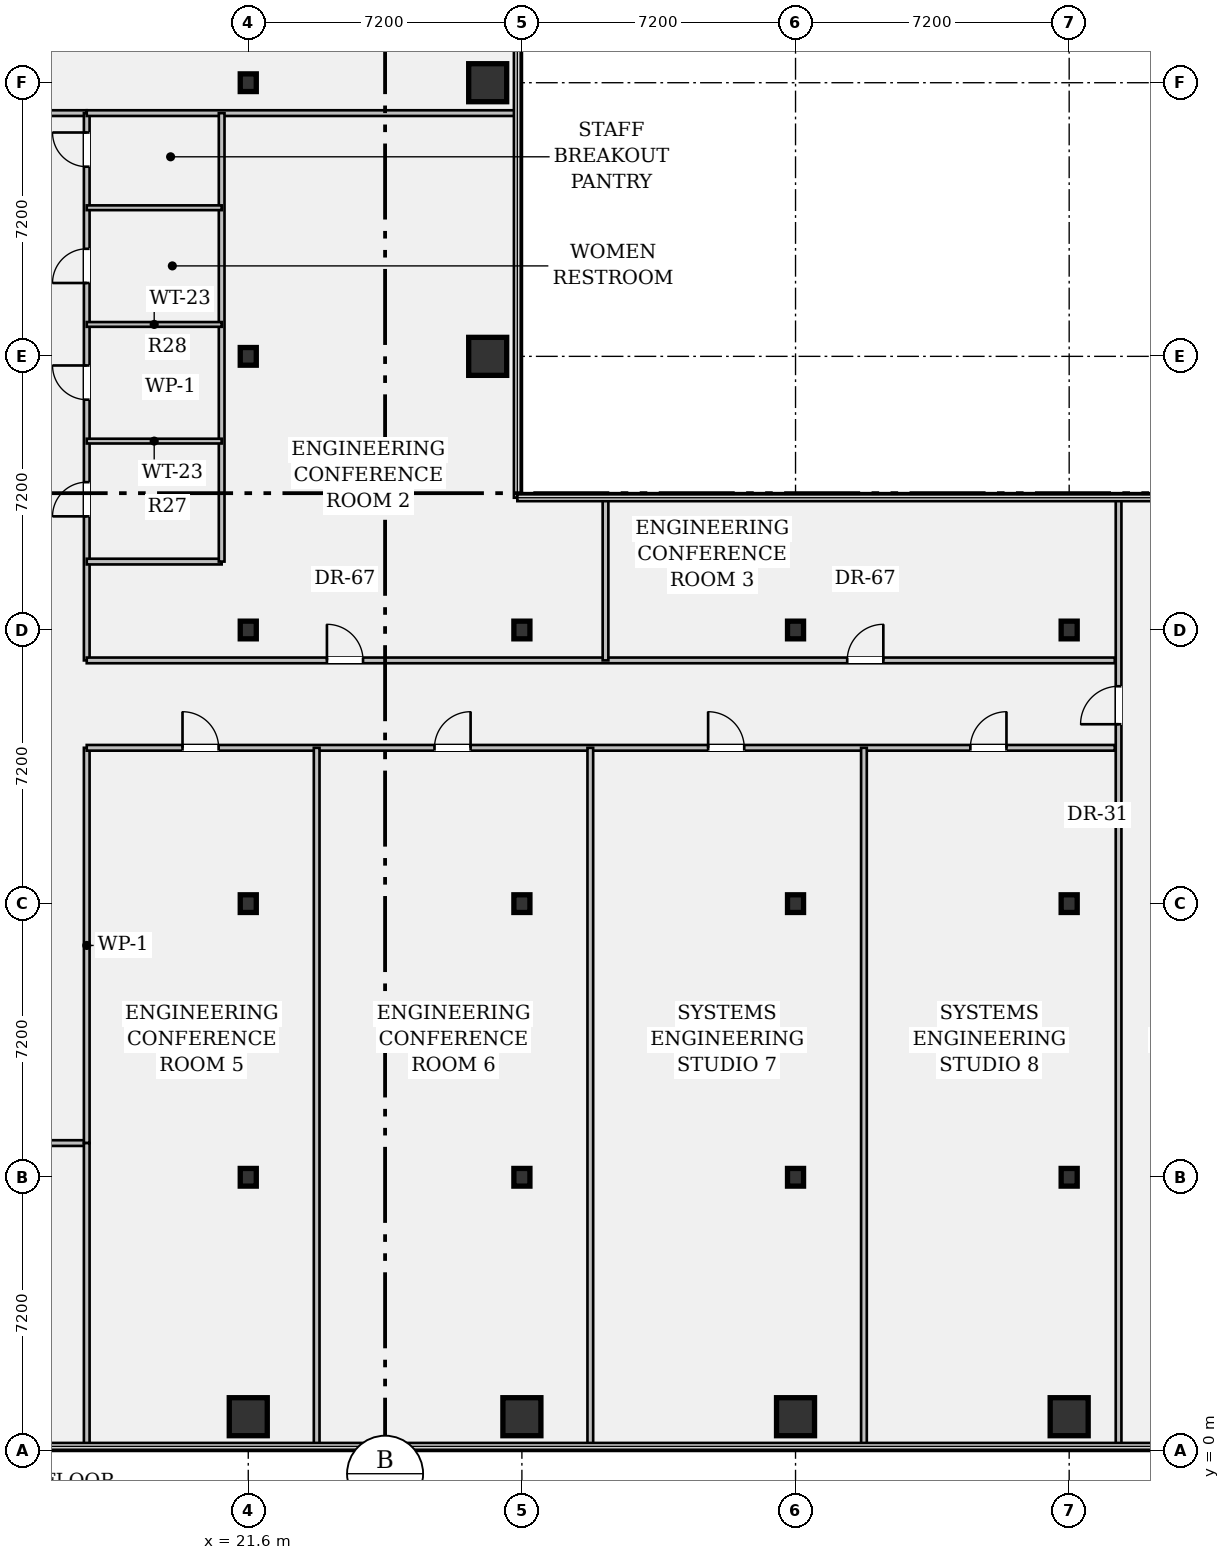
"""IFC4 building model, lengths in metres.
Left out: names, types, materials, properties, quantities, classifications, styles, units other than length and angle.
Written with IfcOpenShell. Run it as: python <this file> out.ifc"""

import sys

from ifc_helpers import new_model, si_unit, direction, frame, frame_2d, origin, origin_2d, place, context, subcontext, project, spatial, rectangle, hollow_rectangle, i_section, extrude, element, fill, save


model = new_model("IFC4")
c1 = context("Model", 3, precision=1e-05, world=origin(), true_north=direction((0.0, 1.0)))
c2 = subcontext(c1, "Body", "Model", "MODEL_VIEW")
j1 = project(units=[si_unit("LENGTHUNIT", "METRE"), si_unit("PLANEANGLEUNIT", "RADIAN")], contexts=[c1])
p1 = place(None, origin())
s1 = spatial("IfcSite", under=j1, at=p1, CompositionType="ELEMENT")
p2 = place(p1, origin())
s2 = spatial("IfcBuilding", under=s1, at=p2, CompositionType="ELEMENT")
p3 = place(p2, frame((0.0, 0.0, 58.1)))
s3 = spatial("IfcBuildingStorey", under=s2, at=p3, CompositionType="ELEMENT", Elevation=58.1)
p4 = place(p3, frame((21.6, 0.9, 0.0), z_axis=(0.0, 0.0, 1.0), x_axis=(1.0, 0.0, 0.0)))
e1 = element("IfcColumn", 1, at=p4, inside=s3, PredefinedType="COLUMN", context=c2, shape_type="SweptSolid", body=[
    extrude(hollow_rectangle(XDim=1.0, YDim=1.0, WallThickness=0.065, at=origin_2d()), origin(), (0.0, 0.0, 1.0), 3.57),
])
for number, where, z_axis, x_axis in (
    (2, (21.6, 7.2, 0.0), (0.0, 0.0, 1.0), (1.0, 0.0, 0.0)),
    (3, (21.6, 14.4, 0.0), (0.0, 0.0, 1.0), (1.0, 0.0, 0.0)),
    (4, (21.6, 21.6, 0.0), (0.0, 0.0, 1.0), (1.0, 0.0, 0.0)),
    (5, (21.6, 28.8, 0.0), (0.0, 0.0, 1.0), (1.0, 0.0, 0.0)),
    (6, (21.6, 36.0, 0.0), (0.0, 0.0, 1.0), (1.0, 0.0, 0.0)),
):
    element("IfcColumn", number, at=place(p3, frame(where, z_axis=z_axis, x_axis=x_axis)), inside=s3, PredefinedType="COLUMN", context=c2, shape_type="SweptSolid", body=[
        extrude(i_section(OverallWidth=0.422, OverallDepth=0.465, WebThickness=0.045, FlangeThickness=0.073, FilletRadius=0.018, at=origin_2d()), origin(), (0.0, 0.0, 1.0), 3.57),
    ])
for number, where, z_axis, x_axis in (
    (7, (27.9, 28.8, 0.0), (0.0, 0.0, 1.0), (1.0, 0.0, 0.0)),
    (8, (27.9, 36.0, 0.0), (0.0, 0.0, 1.0), (1.0, 0.0, 0.0)),
    (9, (28.8, 0.9, 0.0), (0.0, 0.0, 1.0), (1.0, 0.0, 0.0)),
):
    element("IfcColumn", number, at=place(p3, frame(where, z_axis=z_axis, x_axis=x_axis)), inside=s3, PredefinedType="COLUMN", context=c2, shape_type="SweptSolid", body=[
        extrude(hollow_rectangle(XDim=1.0, YDim=1.0, WallThickness=0.065, at=origin_2d()), origin(), (0.0, 0.0, 1.0), 3.57),
    ])
for number, where, z_axis, x_axis in (
    (10, (28.8, 7.2, 0.0), (0.0, 0.0, 1.0), (1.0, 0.0, 0.0)),
    (11, (28.8, 14.4, 0.0), (0.0, 0.0, 1.0), (1.0, 0.0, 0.0)),
    (12, (28.8, 21.6, 0.0), (0.0, 0.0, 1.0), (1.0, 0.0, 0.0)),
):
    element("IfcColumn", number, at=place(p3, frame(where, z_axis=z_axis, x_axis=x_axis)), inside=s3, PredefinedType="COLUMN", context=c2, shape_type="SweptSolid", body=[
        extrude(i_section(OverallWidth=0.422, OverallDepth=0.465, WebThickness=0.045, FlangeThickness=0.073, FilletRadius=0.018, at=origin_2d()), origin(), (0.0, 0.0, 1.0), 3.57),
    ])
p5 = place(p3, frame((36.0, 0.9, 0.0), z_axis=(0.0, 0.0, 1.0), x_axis=(1.0, 0.0, 0.0)))
e13 = element("IfcColumn", 13, at=p5, inside=s3, PredefinedType="COLUMN", context=c2, shape_type="SweptSolid", body=[
    extrude(hollow_rectangle(XDim=1.0, YDim=1.0, WallThickness=0.065, at=origin_2d()), origin(), (0.0, 0.0, 1.0), 3.57),
])
for number, where, z_axis, x_axis in (
    (14, (36.0, 7.2, 0.0), (0.0, 0.0, 1.0), (1.0, 0.0, 0.0)),
    (15, (36.0, 14.4, 0.0), (0.0, 0.0, 1.0), (1.0, 0.0, 0.0)),
    (16, (36.0, 21.6, 0.0), (0.0, 0.0, 1.0), (1.0, 0.0, 0.0)),
):
    element("IfcColumn", number, at=place(p3, frame(where, z_axis=z_axis, x_axis=x_axis)), inside=s3, PredefinedType="COLUMN", context=c2, shape_type="SweptSolid", body=[
        extrude(i_section(OverallWidth=0.422, OverallDepth=0.465, WebThickness=0.045, FlangeThickness=0.073, FilletRadius=0.018, at=origin_2d()), origin(), (0.0, 0.0, 1.0), 3.57),
    ])
p6 = place(p3, frame((43.2, 0.9, 0.0), z_axis=(0.0, 0.0, 1.0), x_axis=(1.0, 0.0, 0.0)))
e17 = element("IfcColumn", 17, at=p6, inside=s3, PredefinedType="COLUMN", context=c2, shape_type="SweptSolid", body=[
    extrude(hollow_rectangle(XDim=1.0, YDim=1.0, WallThickness=0.065, at=origin_2d()), origin(), (0.0, 0.0, 1.0), 3.57),
])
for number, where, z_axis, x_axis in (
    (18, (43.2, 7.2, 0.0), (0.0, 0.0, 1.0), (1.0, 0.0, 0.0)),
    (19, (43.2, 14.4, 0.0), (0.0, 0.0, 1.0), (1.0, 0.0, 0.0)),
    (20, (43.2, 21.6, 0.0), (0.0, 0.0, 1.0), (1.0, 0.0, 0.0)),
):
    element("IfcColumn", number, at=place(p3, frame(where, z_axis=z_axis, x_axis=x_axis)), inside=s3, PredefinedType="COLUMN", context=c2, shape_type="SweptSolid", body=[
        extrude(i_section(OverallWidth=0.422, OverallDepth=0.465, WebThickness=0.045, FlangeThickness=0.073, FilletRadius=0.018, at=origin_2d()), origin(), (0.0, 0.0, 1.0), 3.57),
    ])
p7 = place(p3, frame((14.4, 8.1, 0.0), z_axis=(0.0, 0.0, 1.0), x_axis=(1.0, 0.0, 0.0)))
e21 = element("IfcWall", 21, at=p7, inside=s3, PredefinedType="PARTITIONING", context=c2, shape_type="SweptSolid", body=[
    extrude(rectangle(XDim=2.95, YDim=0.15, at=frame_2d((1.475, 0.0))), origin(), (0.0, 0.0, 1.0), 3.088),
])
p8 = place(p7, frame((0.95, 0.0, 0.0)))
e22 = element("IfcOpeningElement", 22, at=p8, cuts=e21, PredefinedType="OPENING", context=c2, shape_type="SweptSolid", body=[
    extrude(rectangle(XDim=0.95, YDim=2.15, at=frame_2d((0.475, 1.075))), frame((0.0, 0.087, 0.0), z_axis=(0.0, -1.0, 0.0), x_axis=(1.0, 0.0, 0.0)), (0.0, 0.0, 1.0), 0.174),
])
p9 = place(p3, frame((14.4, 35.2, 0.0), z_axis=(0.0, 0.0, 1.0), x_axis=(1.0, 0.0, 0.0)))
e23 = element("IfcWall", 23, at=p9, inside=s3, PredefinedType="PARTITIONING", context=c2, shape_type="SweptSolid", body=[
    extrude(rectangle(XDim=2.95, YDim=0.15, at=frame_2d((1.475, 0.0))), origin(), (0.0, 0.0, 1.0), 3.088),
])
p10 = place(p9, frame((0.95, 0.0, 0.0)))
e24 = element("IfcOpeningElement", 24, at=p10, cuts=e23, PredefinedType="OPENING", context=c2, shape_type="SweptSolid", body=[
    extrude(rectangle(XDim=1.0, YDim=2.15, at=frame_2d((0.5, 1.075))), frame((0.0, 0.087, 0.0), z_axis=(0.0, -1.0, 0.0), x_axis=(1.0, 0.0, 0.0)), (0.0, 0.0, 1.0), 0.174),
])
p11 = place(p3, frame((17.35, 8.1, 0.0), z_axis=(0.0, 0.0, 1.0), x_axis=(0.0, 1.0, 0.0)))
e25 = element("IfcWall", 25, at=p11, inside=s3, PredefinedType="PARTITIONING", context=c2, shape_type="SweptSolid", body=[
    extrude(rectangle(XDim=10.4, YDim=0.15, at=frame_2d((5.2, 0.0))), origin(), (0.0, 0.0, 1.0), 2.699),
])
p12 = place(p3, frame((17.35, 20.8, 0.0), z_axis=(0.0, 0.0, 1.0), x_axis=(0.0, 1.0, 0.0)))
e26 = element("IfcWall", 26, at=p12, inside=s3, PredefinedType="PARTITIONING", context=c2, shape_type="SweptSolid", body=[
    extrude(rectangle(XDim=14.4, YDim=0.15, at=frame_2d((7.2, 0.0))), origin(), (0.0, 0.0, 1.0), 2.699),
])
p13 = place(p12, frame((3.79, 0.0, 0.0)))
e27 = element("IfcOpeningElement", 27, at=p13, cuts=e26, PredefinedType="OPENING", context=c2, shape_type="SweptSolid", body=[
    extrude(rectangle(XDim=0.9, YDim=2.15, at=frame_2d((0.45, 1.075))), frame((0.0, 0.087, 0.0), z_axis=(0.0, -1.0, 0.0), x_axis=(1.0, 0.0, 0.0)), (0.0, 0.0, 1.0), 0.174),
])
p14 = place(p12, frame((6.86, 0.0, 0.0)))
e28 = element("IfcOpeningElement", 28, at=p14, cuts=e26, PredefinedType="OPENING", context=c2, shape_type="SweptSolid", body=[
    extrude(rectangle(XDim=0.9, YDim=2.15, at=frame_2d((0.45, 1.075))), frame((0.0, 0.087, 0.0), z_axis=(0.0, -1.0, 0.0), x_axis=(1.0, 0.0, 0.0)), (0.0, 0.0, 1.0), 0.174),
])
p15 = place(p12, frame((9.93, 0.0, 0.0)))
e29 = element("IfcOpeningElement", 29, at=p15, cuts=e26, PredefinedType="OPENING", context=c2, shape_type="SweptSolid", body=[
    extrude(rectangle(XDim=0.9, YDim=2.15, at=frame_2d((0.45, 1.075))), frame((0.0, 0.087, 0.0), z_axis=(0.0, -1.0, 0.0), x_axis=(1.0, 0.0, 0.0)), (0.0, 0.0, 1.0), 0.174),
])
p16 = place(p12, frame((12.99, 0.0, 0.0)))
e30 = element("IfcOpeningElement", 30, at=p16, cuts=e26, PredefinedType="OPENING", context=c2, shape_type="SweptSolid", body=[
    extrude(rectangle(XDim=0.9, YDim=2.15, at=frame_2d((0.45, 1.075))), frame((0.0, 0.087, 0.0), z_axis=(0.0, -1.0, 0.0), x_axis=(1.0, 0.0, 0.0)), (0.0, 0.0, 1.0), 0.174),
])
p17 = place(p3, frame((17.35, 18.5, 0.0), z_axis=(0.0, 0.0, 1.0), x_axis=(1.0, 0.0, 0.0)))
e31 = element("IfcWall", 31, at=p17, inside=s3, PredefinedType="PARTITIONING", context=c2, shape_type="SweptSolid", body=[
    extrude(rectangle(XDim=27.05, YDim=0.15, at=frame_2d((13.525, 0.0))), origin(), (0.0, 0.0, 1.0), 2.699),
])
p18 = place(p17, frame((2.52, 0.0, 0.0)))
e32 = element("IfcOpeningElement", 32, at=p18, cuts=e31, PredefinedType="OPENING", context=c2, shape_type="SweptSolid", body=[
    extrude(rectangle(XDim=0.95, YDim=2.15, at=frame_2d((0.475, 1.075))), frame((0.0, 0.087, 0.0), z_axis=(0.0, -1.0, 0.0), x_axis=(1.0, 0.0, 0.0)), (0.0, 0.0, 1.0), 0.174),
])
p19 = place(p17, frame((9.15, 0.0, 0.0)))
e33 = element("IfcOpeningElement", 33, at=p19, cuts=e31, PredefinedType="OPENING", context=c2, shape_type="SweptSolid", body=[
    extrude(rectangle(XDim=0.95, YDim=2.15, at=frame_2d((0.475, 1.075))), frame((0.0, 0.087, 0.0), z_axis=(0.0, -1.0, 0.0), x_axis=(1.0, 0.0, 0.0)), (0.0, 0.0, 1.0), 0.174),
])
p20 = place(p17, frame((16.35, 0.0, 0.0)))
e34 = element("IfcOpeningElement", 34, at=p20, cuts=e31, PredefinedType="OPENING", context=c2, shape_type="SweptSolid", body=[
    extrude(rectangle(XDim=0.95, YDim=2.15, at=frame_2d((0.475, 1.075))), frame((0.0, 0.087, 0.0), z_axis=(0.0, -1.0, 0.0), x_axis=(1.0, 0.0, 0.0)), (0.0, 0.0, 1.0), 0.174),
])
p21 = place(p17, frame((23.25, 0.0, 0.0)))
e35 = element("IfcOpeningElement", 35, at=p21, cuts=e31, PredefinedType="OPENING", context=c2, shape_type="SweptSolid", body=[
    extrude(rectangle(XDim=0.95, YDim=2.15, at=frame_2d((0.475, 1.075))), frame((0.0, 0.087, 0.0), z_axis=(0.0, -1.0, 0.0), x_axis=(1.0, 0.0, 0.0)), (0.0, 0.0, 1.0), 0.174),
])
p22 = place(p3, frame((17.35, 20.8, 0.0), z_axis=(0.0, 0.0, 1.0), x_axis=(1.0, 0.0, 0.0)))
e36 = element("IfcWall", 36, at=p22, inside=s3, PredefinedType="PARTITIONING", context=c2, shape_type="SweptSolid", body=[
    extrude(rectangle(XDim=27.05, YDim=0.15, at=frame_2d((13.525, 0.0))), origin(), (0.0, 0.0, 1.0), 2.699),
])
p23 = place(p22, frame((6.32, 0.0, 0.0)))
e37 = element("IfcOpeningElement", 37, at=p23, cuts=e36, PredefinedType="OPENING", context=c2, shape_type="SweptSolid", body=[
    extrude(rectangle(XDim=0.95, YDim=2.15, at=frame_2d((0.475, 1.075))), frame((0.0, 0.087, 0.0), z_axis=(0.0, -1.0, 0.0), x_axis=(1.0, 0.0, 0.0)), (0.0, 0.0, 1.0), 0.174),
])
p24 = place(p22, frame((20.01, 0.0, 0.0)))
e38 = element("IfcOpeningElement", 38, at=p24, cuts=e36, PredefinedType="OPENING", context=c2, shape_type="SweptSolid", body=[
    extrude(rectangle(XDim=0.95, YDim=2.15, at=frame_2d((0.475, 1.075))), frame((0.0, 0.087, 0.0), z_axis=(0.0, -1.0, 0.0), x_axis=(1.0, 0.0, 0.0)), (0.0, 0.0, 1.0), 0.174),
])
p25 = place(p3, frame((44.5, 0.12, 0.0), z_axis=(0.0, 0.0, 1.0), x_axis=(0.0, 1.0, 0.0)))
e39 = element("IfcWall", 39, at=p25, inside=s3, PredefinedType="PARTITIONING", context=c2, shape_type="SweptSolid", body=[
    extrude(rectangle(XDim=24.96, YDim=0.15, at=frame_2d((12.48, 0.0))), origin(), (0.0, 0.0, 1.0), 2.699),
])
p26 = place(p25, frame((19.0, 0.0, 0.0)))
e40 = element("IfcOpeningElement", 40, at=p26, cuts=e39, PredefinedType="OPENING", context=c2, shape_type="SweptSolid", body=[
    extrude(rectangle(XDim=1.0, YDim=2.15, at=frame_2d((0.5, 1.075))), frame((0.0, 0.087, 0.0), z_axis=(0.0, -1.0, 0.0), x_axis=(1.0, 0.0, 0.0)), (0.0, 0.0, 1.0), 0.174),
])
p27 = place(p3, frame((17.35, 35.2, 0.0), z_axis=(0.0, 0.0, 1.0), x_axis=(1.0, 0.0, 0.0)))
e41 = element("IfcWall", 41, at=p27, inside=s3, PredefinedType="PARTITIONING", context=c2, shape_type="SweptSolid", body=[
    extrude(rectangle(XDim=11.33, YDim=0.15, at=frame_2d((5.665, 0.0))), origin(), (0.0, 0.0, 1.0), 2.699),
])
p28 = place(p3, frame((17.35, 23.4, 0.0), z_axis=(0.0, 0.0, 1.0), x_axis=(1.0, 0.0, 0.0)))
e42 = element("IfcWall", 42, at=p28, inside=s3, PredefinedType="PARTITIONING", context=c2, shape_type="SweptSolid", body=[
    extrude(rectangle(XDim=3.55, YDim=0.15, at=frame_2d((1.775, 0.0))), origin(), (0.0, 0.0, 1.0), 3.088),
])
p29 = place(p3, frame((20.9, 23.4, 0.0), z_axis=(0.0, 0.0, 1.0), x_axis=(0.0, 1.0, 0.0)))
e43 = element("IfcWall", 43, at=p29, inside=s3, PredefinedType="PARTITIONING", context=c2, shape_type="SweptSolid", body=[
    extrude(rectangle(XDim=11.8, YDim=0.15, at=frame_2d((5.9, 0.0))), origin(), (0.0, 0.0, 1.0), 2.699),
])
for number, where, z_axis, x_axis in (
    (44, (17.35, 26.57, 0.0), (0.0, 0.0, 1.0), (1.0, 0.0, 0.0)),
    (45, (17.35, 29.64, 0.0), (0.0, 0.0, 1.0), (1.0, 0.0, 0.0)),
    (46, (17.35, 32.71, 0.0), (0.0, 0.0, 1.0), (1.0, 0.0, 0.0)),
):
    element("IfcWall", number, at=place(p3, frame(where, z_axis=z_axis, x_axis=x_axis)), inside=s3, PredefinedType="PARTITIONING", context=c2, shape_type="SweptSolid", body=[
        extrude(rectangle(XDim=3.55, YDim=0.125, at=frame_2d((1.775, 0.0))), origin(), (0.0, 0.0, 1.0), 3.088),
    ])
p30 = place(p3, frame((31.0, 20.8, 0.0), z_axis=(0.0, 0.0, 1.0), x_axis=(0.0, 1.0, 0.0)))
e47 = element("IfcWall", 47, at=p30, inside=s3, PredefinedType="PARTITIONING", context=c2, shape_type="SweptSolid", body=[
    extrude(rectangle(XDim=4.25, YDim=0.15, at=frame_2d((2.125, 0.0))), origin(), (0.0, 0.0, 1.0), 2.699),
])
p31 = place(p3, frame((17.35, 0.12, 0.0), z_axis=(0.0, 0.0, 1.0), x_axis=(0.0, 1.0, 0.0)))
e48 = element("IfcWall", 48, at=p31, inside=s3, PredefinedType="PARTITIONING", context=c2, shape_type="SweptSolid", body=[
    extrude(rectangle(XDim=7.98, YDim=0.15, at=frame_2d((3.99, 0.0))), origin(), (0.0, 0.0, 1.0), 2.699),
])
for number, where, z_axis, x_axis in (
    (49, (23.4, 0.12, 0.0), (0.0, 0.0, 1.0), (0.0, 1.0, 0.0)),
    (50, (30.6, 0.12, 0.0), (0.0, 0.0, 1.0), (0.0, 1.0, 0.0)),
    (51, (37.8, 0.12, 0.0), (0.0, 0.0, 1.0), (0.0, 1.0, 0.0)),
):
    element("IfcWall", number, at=place(p3, frame(where, z_axis=z_axis, x_axis=x_axis)), inside=s3, PredefinedType="PARTITIONING", context=c2, shape_type="SweptSolid", body=[
        extrude(rectangle(XDim=18.38, YDim=0.15, at=frame_2d((9.19, 0.0))), origin(), (0.0, 0.0, 1.0), 2.699),
    ])
p32 = place(p13, origin())
e52 = element("IfcDoor", 52, at=p32, inside=s3, OperationType="SINGLE_SWING_LEFT", PredefinedType="DOOR", context=c2, shape_type="SweptSolid", body=[
    extrude(rectangle(XDim=0.9, YDim=2.15, at=frame_2d((0.45, 1.075))), frame((0.0, 0.025, 0.0), z_axis=(0.0, -1.0, 0.0), x_axis=(1.0, 0.0, 0.0)), (0.0, 0.0, 1.0), 0.05),
])
fill(e27, e52)
p33 = place(p14, origin())
e53 = element("IfcDoor", 53, at=p33, inside=s3, OperationType="SINGLE_SWING_RIGHT", PredefinedType="DOOR", context=c2, shape_type="SweptSolid", body=[
    extrude(rectangle(XDim=0.9, YDim=2.15, at=frame_2d((0.45, 1.075))), frame((0.0, 0.025, 0.0), z_axis=(0.0, -1.0, 0.0), x_axis=(1.0, 0.0, 0.0)), (0.0, 0.0, 1.0), 0.05),
])
fill(e28, e53)
p34 = place(p15, origin())
e54 = element("IfcDoor", 54, at=p34, inside=s3, OperationType="SINGLE_SWING_LEFT", PredefinedType="DOOR", context=c2, shape_type="SweptSolid", body=[
    extrude(rectangle(XDim=0.9, YDim=2.15, at=frame_2d((0.45, 1.075))), frame((0.0, 0.025, 0.0), z_axis=(0.0, -1.0, 0.0), x_axis=(1.0, 0.0, 0.0)), (0.0, 0.0, 1.0), 0.05),
])
fill(e29, e54)
p35 = place(p16, origin())
e55 = element("IfcDoor", 55, at=p35, inside=s3, OperationType="SINGLE_SWING_RIGHT", PredefinedType="DOOR", context=c2, shape_type="SweptSolid", body=[
    extrude(rectangle(XDim=0.9, YDim=2.15, at=frame_2d((0.45, 1.075))), frame((0.0, 0.025, 0.0), z_axis=(0.0, -1.0, 0.0), x_axis=(1.0, 0.0, 0.0)), (0.0, 0.0, 1.0), 0.05),
])
fill(e30, e55)
p36 = place(p23, origin())
e56 = element("IfcDoor", 56, at=p36, inside=s3, OperationType="SINGLE_SWING_LEFT", PredefinedType="DOOR", context=c2, shape_type="SweptSolid", body=[
    extrude(rectangle(XDim=0.95, YDim=2.15, at=frame_2d((0.475, 1.075))), frame((0.0, 0.025, 0.0), z_axis=(0.0, -1.0, 0.0), x_axis=(1.0, 0.0, 0.0)), (0.0, 0.0, 1.0), 0.05),
])
fill(e37, e56)
p37 = place(p24, origin())
e57 = element("IfcDoor", 57, at=p37, inside=s3, OperationType="SINGLE_SWING_RIGHT", PredefinedType="DOOR", context=c2, shape_type="SweptSolid", body=[
    extrude(rectangle(XDim=0.95, YDim=2.15, at=frame_2d((0.475, 1.075))), frame((0.0, 0.025, 0.0), z_axis=(0.0, -1.0, 0.0), x_axis=(1.0, 0.0, 0.0)), (0.0, 0.0, 1.0), 0.05),
])
fill(e38, e57)
p38 = place(p18, origin())
e58 = element("IfcDoor", 58, at=p38, inside=s3, OperationType="SINGLE_SWING_LEFT", PredefinedType="DOOR", context=c2, shape_type="SweptSolid", body=[
    extrude(rectangle(XDim=0.95, YDim=2.15, at=frame_2d((0.475, 1.075))), frame((0.0, 0.025, 0.0), z_axis=(0.0, -1.0, 0.0), x_axis=(1.0, 0.0, 0.0)), (0.0, 0.0, 1.0), 0.05),
])
fill(e32, e58)
p39 = place(p19, origin())
e59 = element("IfcDoor", 59, at=p39, inside=s3, OperationType="SINGLE_SWING_RIGHT", PredefinedType="DOOR", context=c2, shape_type="SweptSolid", body=[
    extrude(rectangle(XDim=0.95, YDim=2.15, at=frame_2d((0.475, 1.075))), frame((0.0, 0.025, 0.0), z_axis=(0.0, -1.0, 0.0), x_axis=(1.0, 0.0, 0.0)), (0.0, 0.0, 1.0), 0.05),
])
fill(e33, e59)
p40 = place(p20, origin())
e60 = element("IfcDoor", 60, at=p40, inside=s3, OperationType="SINGLE_SWING_LEFT", PredefinedType="DOOR", context=c2, shape_type="SweptSolid", body=[
    extrude(rectangle(XDim=0.95, YDim=2.15, at=frame_2d((0.475, 1.075))), frame((0.0, 0.025, 0.0), z_axis=(0.0, -1.0, 0.0), x_axis=(1.0, 0.0, 0.0)), (0.0, 0.0, 1.0), 0.05),
])
fill(e34, e60)
p41 = place(p21, origin())
e61 = element("IfcDoor", 61, at=p41, inside=s3, OperationType="SINGLE_SWING_RIGHT", PredefinedType="DOOR", context=c2, shape_type="SweptSolid", body=[
    extrude(rectangle(XDim=0.95, YDim=2.15, at=frame_2d((0.475, 1.075))), frame((0.0, 0.025, 0.0), z_axis=(0.0, -1.0, 0.0), x_axis=(1.0, 0.0, 0.0)), (0.0, 0.0, 1.0), 0.05),
])
fill(e35, e61)
p42 = place(p26, origin())
e62 = element("IfcDoor", 62, at=p42, inside=s3, OperationType="SINGLE_SWING_LEFT", PredefinedType="DOOR", context=c2, shape_type="SweptSolid", body=[
    extrude(rectangle(XDim=1.0, YDim=2.15, at=frame_2d((0.5, 1.075))), frame((0.0, 0.025, 0.0), z_axis=(0.0, -1.0, 0.0), x_axis=(1.0, 0.0, 0.0)), (0.0, 0.0, 1.0), 0.05),
])
fill(e40, e62)
save(model, sys.argv[1])
